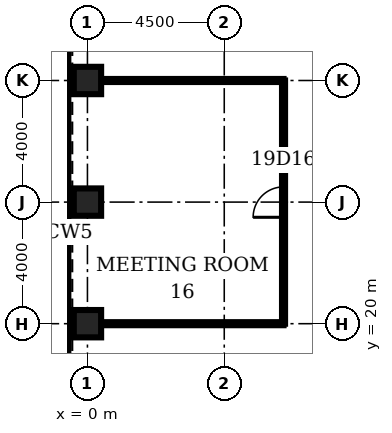
"""IFC4 building model, lengths in metres.
Left out: names, types, materials, properties, quantities, classifications, styles, units other than length and angle.
Written with IfcOpenShell. Run it as: python <this file> out.ifc"""

import sys

from ifc_helpers import new_model, si_unit, direction, frame, frame_2d, origin, origin_2d, place, context, subcontext, project, spatial, rectangle, hollow_rectangle, extrude, element, fill, save


model = new_model("IFC4")
c1 = context("Model", 3, precision=1e-05, world=origin(), true_north=direction((0.0, 1.0)))
c2 = subcontext(c1, "Body", "Model", "MODEL_VIEW")
j1 = project(units=[si_unit("LENGTHUNIT", "METRE"), si_unit("PLANEANGLEUNIT", "RADIAN")], contexts=[c1])
p1 = place(None, origin())
s1 = spatial("IfcSite", under=j1, at=p1, CompositionType="ELEMENT")
p2 = place(p1, origin())
s2 = spatial("IfcBuilding", under=s1, at=p2, CompositionType="ELEMENT")
p3 = place(p2, frame((0.0, 0.0, 90.5)))
s3 = spatial("IfcBuildingStorey", under=s2, at=p3, CompositionType="ELEMENT", Elevation=90.5)
for number, where, z_axis, x_axis in (
    (1, (0.0, 28.0, 0.0), (0.0, 0.0, 1.0), (1.0, 0.0, 0.0)),
    (2, (0.0, 24.0, 0.0), (0.0, 0.0, 1.0), (1.0, 0.0, 0.0)),
    (3, (0.0, 20.0, 0.0), (0.0, 0.0, 1.0), (1.0, 0.0, 0.0)),
):
    element("IfcColumn", number, at=place(p3, frame(where, z_axis=z_axis, x_axis=x_axis)), inside=s3, PredefinedType="COLUMN", context=c2, shape_type="SweptSolid", body=[
        extrude(hollow_rectangle(XDim=0.9, YDim=0.9, WallThickness=0.11, at=origin_2d()), origin(), (0.0, 0.0, 1.0), 4.5),
    ])
for number, where, z_axis, x_axis in (
    (4, (0.45, 20.0, 0.0), (0.0, 0.0, 1.0), (1.0, 0.0, 0.0)),
    (5, (0.45, 28.0, 0.0), (0.0, 0.0, 1.0), (1.0, 0.0, 0.0)),
):
    element("IfcWall", number, at=place(p3, frame(where, z_axis=z_axis, x_axis=x_axis)), inside=s3, PredefinedType="PARTITIONING", context=c2, shape_type="SweptSolid", body=[
        extrude(rectangle(XDim=6.0, YDim=0.1, at=frame_2d((3.0, 0.0))), origin(), (0.0, 0.0, 1.0), 3.0),
    ])
p4 = place(p3, frame((6.45, 20.0, 0.0), z_axis=(0.0, 0.0, 1.0), x_axis=(0.0, 1.0, 0.0)))
e6 = element("IfcWall", 6, at=p4, inside=s3, PredefinedType="PARTITIONING", context=c2, shape_type="SweptSolid", body=[
    extrude(rectangle(XDim=8.0, YDim=0.1, at=frame_2d((4.0, 0.0))), origin(), (0.0, 0.0, 1.0), 3.0),
])
p5 = place(p4, frame((3.5, 0.0, 0.0)))
e7 = element("IfcOpeningElement", 7, at=p5, cuts=e6, PredefinedType="OPENING", context=c2, shape_type="SweptSolid", body=[
    extrude(rectangle(XDim=1.0, YDim=2.1, at=frame_2d((0.5, 1.05))), frame((0.0, 0.06, 0.0), z_axis=(0.0, -1.0, 0.0), x_axis=(1.0, 0.0, 0.0)), (0.0, 0.0, 1.0), 0.12),
])
p6 = place(p5, origin())
e8 = element("IfcDoor", 8, at=p6, inside=s3, OperationType="SINGLE_SWING_LEFT", PredefinedType="DOOR", context=c2, shape_type="SweptSolid", body=[
    extrude(rectangle(XDim=1.0, YDim=2.1, at=frame_2d((0.5, 1.05))), frame((0.0, 0.025, 0.0), z_axis=(0.0, -1.0, 0.0), x_axis=(1.0, 0.0, 0.0)), (0.0, 0.0, 1.0), 0.05),
])
fill(e7, e8)
save(model, sys.argv[1])
